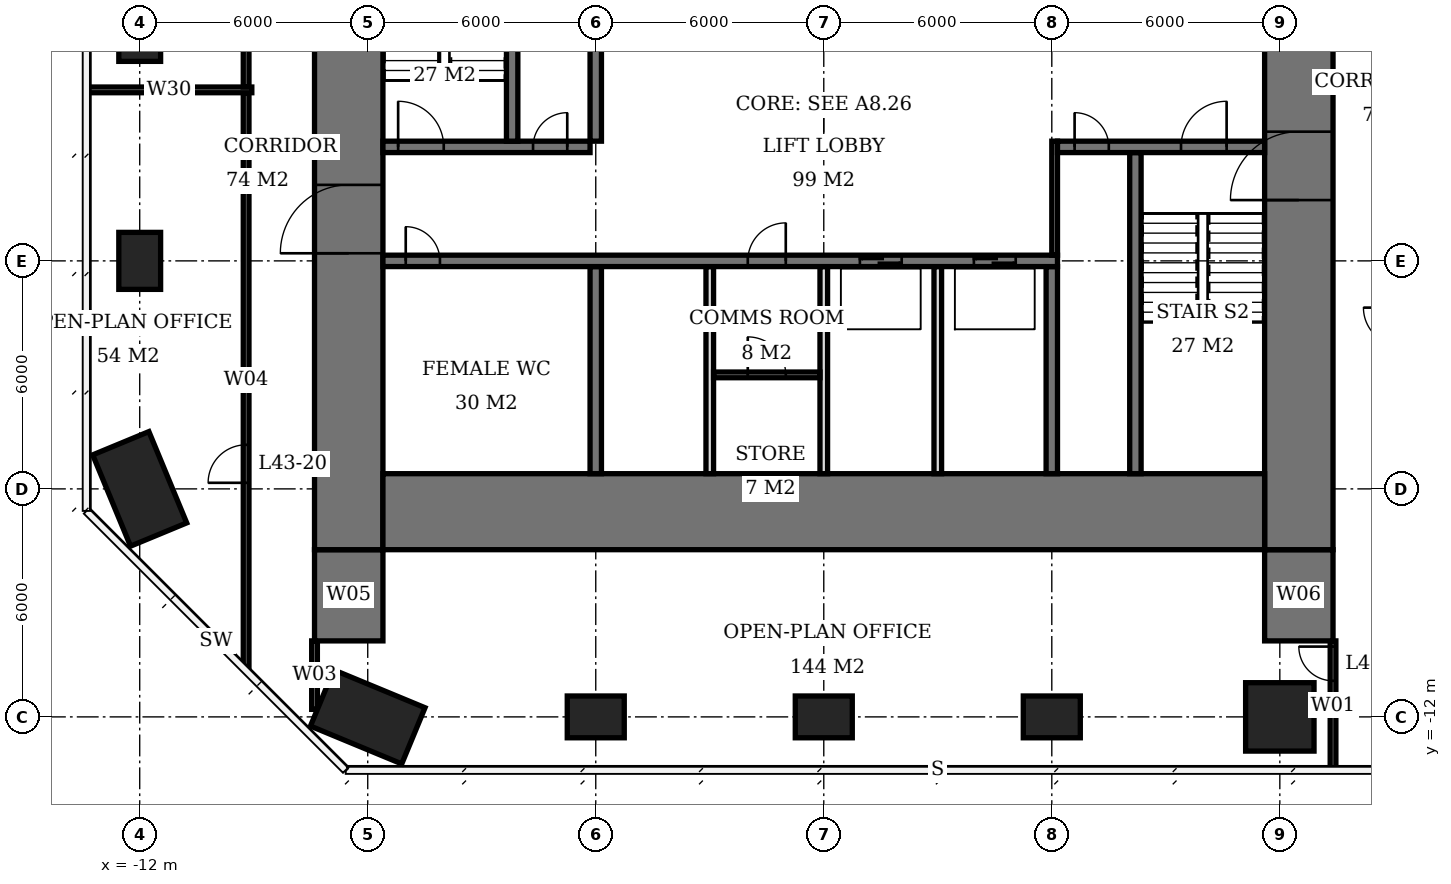
"""IFC4 building model, lengths in metres.
Left out: names, types, materials, properties, quantities, classifications, styles, units other than length and angle.
Written with IfcOpenShell. Run it as: python <this file> out.ifc"""

import sys

from ifc_helpers import new_model, si_unit, direction, frame, frame_2d, origin, origin_2d, place, context, subcontext, project, spatial, rectangle, extrude, element, fill, save


model = new_model("IFC4")
c1 = context("Model", 3, precision=1e-05, world=origin(), true_north=direction((0.0, 1.0)))
c2 = subcontext(c1, "Body", "Model", "MODEL_VIEW")
j1 = project(units=[si_unit("LENGTHUNIT", "METRE"), si_unit("PLANEANGLEUNIT", "RADIAN")], contexts=[c1])
p1 = place(None, origin())
s1 = spatial("IfcSite", under=j1, at=p1, CompositionType="ELEMENT")
p2 = place(p1, origin())
s2 = spatial("IfcBuilding", under=s1, at=p2, CompositionType="ELEMENT")
p3 = place(p2, frame((0.0, 0.0, 177.2)))
s3 = spatial("IfcBuildingStorey", under=s2, at=p3, CompositionType="ELEMENT", Elevation=177.2)
p4 = place(p3, frame((-12.0, -6.0, 0.0), z_axis=(0.0, 0.0, 1.0), x_axis=(-0.382683432365, 0.923879532511, 0.0)))
e1 = element("IfcColumn", 1, at=p4, inside=s3, PredefinedType="COLUMN", context=c2, shape_type="SweptSolid", body=[
    extrude(rectangle(XDim=2.6, YDim=1.6, at=origin_2d()), origin(), (0.0, 0.0, 1.0), 3.9),
])
for number, where, z_axis, x_axis in (
    (2, (-12.0, 0.0, 0.0), (0.0, 0.0, 1.0), (0.0, 1.0, 0.0)),
    (3, (-12.0, 6.0, 0.0), (0.0, 0.0, 1.0), (0.0, 1.0, 0.0)),
):
    element("IfcColumn", number, at=place(p3, frame(where, z_axis=z_axis, x_axis=x_axis)), inside=s3, PredefinedType="COLUMN", context=c2, shape_type="SweptSolid", body=[
        extrude(rectangle(XDim=1.5, YDim=1.1, at=origin_2d()), origin(), (0.0, 0.0, 1.0), 3.9),
    ])
p5 = place(p3, frame((-6.0, -12.0, 0.0), z_axis=(0.0, 0.0, 1.0), x_axis=(-0.923879532511, 0.382683432365, 0.0)))
e4 = element("IfcColumn", 4, at=p5, inside=s3, PredefinedType="COLUMN", context=c2, shape_type="SweptSolid", body=[
    extrude(rectangle(XDim=2.6, YDim=1.6, at=origin_2d()), origin(), (0.0, 0.0, 1.0), 3.9),
])
for number, where, z_axis, x_axis in (
    (5, (0.0, -12.0, 0.0), (0.0, 0.0, 1.0), (1.0, 0.0, 0.0)),
    (6, (6.0, -12.0, 0.0), (0.0, 0.0, 1.0), (1.0, 0.0, 0.0)),
    (7, (12.0, -12.0, 0.0), (0.0, 0.0, 1.0), (1.0, 0.0, 0.0)),
):
    element("IfcColumn", number, at=place(p3, frame(where, z_axis=z_axis, x_axis=x_axis)), inside=s3, PredefinedType="COLUMN", context=c2, shape_type="SweptSolid", body=[
        extrude(rectangle(XDim=1.5, YDim=1.1, at=origin_2d()), origin(), (0.0, 0.0, 1.0), 3.9),
    ])
p6 = place(p3, frame((18.0, -12.0, 0.0), z_axis=(0.0, 0.0, 1.0), x_axis=(1.0, 0.0, 0.0)))
e8 = element("IfcColumn", 8, at=p6, inside=s3, PredefinedType="COLUMN", context=c2, shape_type="SweptSolid", body=[
    extrude(rectangle(XDim=1.8, YDim=1.8, at=origin_2d()), origin(), (0.0, 0.0, 1.0), 3.9),
])
p7 = place(p3, frame((-5.6, -6.6, 0.0), z_axis=(0.0, 0.0, 1.0), x_axis=(1.0, 0.0, 0.0)))
e9 = element("IfcWall", 9, at=p7, inside=s3, PredefinedType="SHEAR", context=c2, shape_type="SweptSolid", body=[
    extrude(rectangle(XDim=23.2, YDim=2.0, at=frame_2d((11.6, 0.0))), origin(), (0.0, 0.0, 1.0), 3.9),
])
p8 = place(p3, frame((-6.5, -7.6, 0.0), z_axis=(0.0, 0.0, 1.0), x_axis=(0.0, 1.0, 0.0)))
e10 = element("IfcWall", 10, at=p8, inside=s3, PredefinedType="SHEAR", context=c2, shape_type="SweptSolid", body=[
    extrude(rectangle(XDim=21.2, YDim=1.8, at=frame_2d((10.6, 0.0))), origin(), (0.0, 0.0, 1.0), 3.9),
])
p9 = place(p8, frame((7.8, 0.0, 0.0)))
e11 = element("IfcOpeningElement", 11, at=p9, cuts=e10, PredefinedType="OPENING", context=c2, shape_type="SweptSolid", body=[
    extrude(rectangle(XDim=1.8, YDim=2.4, at=frame_2d((0.9, 1.2))), frame((0.0, 0.91, 0.0), z_axis=(0.0, -1.0, 0.0), x_axis=(1.0, 0.0, 0.0)), (0.0, 0.0, 1.0), 1.82),
])
p10 = place(p3, frame((18.5, -7.6, 0.0), z_axis=(0.0, 0.0, 1.0), x_axis=(0.0, 1.0, 0.0)))
e12 = element("IfcWall", 12, at=p10, inside=s3, PredefinedType="SHEAR", context=c2, shape_type="SweptSolid", body=[
    extrude(rectangle(XDim=21.2, YDim=1.8, at=frame_2d((10.6, 0.0))), origin(), (0.0, 0.0, 1.0), 3.9),
])
p11 = place(p10, frame((9.2, 0.0, 0.0)))
e13 = element("IfcOpeningElement", 13, at=p11, cuts=e12, PredefinedType="OPENING", context=c2, shape_type="SweptSolid", body=[
    extrude(rectangle(XDim=1.8, YDim=2.4, at=frame_2d((0.9, 1.2))), frame((0.0, 0.91, 0.0), z_axis=(0.0, -1.0, 0.0), x_axis=(1.0, 0.0, 0.0)), (0.0, 0.0, 1.0), 1.82),
])
for number, where, z_axis, x_axis in (
    (14, (-6.5, -10.0, 0.0), (0.0, 0.0, 1.0), (0.0, 1.0, 0.0)),
    (15, (18.5, -10.0, 0.0), (0.0, 0.0, 1.0), (0.0, 1.0, 0.0)),
):
    element("IfcWall", number, at=place(p3, frame(where, z_axis=z_axis, x_axis=x_axis)), inside=s3, PredefinedType="SHEAR", context=c2, shape_type="SweptSolid", body=[
        extrude(rectangle(XDim=2.4, YDim=1.8, at=frame_2d((1.2, 0.0))), origin(), (0.0, 0.0, 1.0), 3.9),
    ])
p12 = place(p3, frame((-5.6, 0.0, 0.0), z_axis=(0.0, 0.0, 1.0), x_axis=(1.0, 0.0, 0.0)))
e16 = element("IfcWall", 16, at=p12, inside=s3, PredefinedType="SHEAR", context=c2, shape_type="SweptSolid", body=[
    extrude(rectangle(XDim=17.75, YDim=0.3, at=frame_2d((8.875, 0.0))), origin(), (0.0, 0.0, 1.0), 3.9),
])
p13 = place(p12, frame((0.6, 0.0, 0.0)))
e17 = element("IfcOpeningElement", 17, at=p13, cuts=e16, PredefinedType="OPENING", context=c2, shape_type="SweptSolid", body=[
    extrude(rectangle(XDim=0.9, YDim=2.1, at=frame_2d((0.45, 1.05))), frame((0.0, 0.16, 0.0), z_axis=(0.0, -1.0, 0.0), x_axis=(1.0, 0.0, 0.0)), (0.0, 0.0, 1.0), 0.32),
])
p14 = place(p12, frame((9.6, 0.0, 0.0)))
e18 = element("IfcOpeningElement", 18, at=p14, cuts=e16, PredefinedType="OPENING", context=c2, shape_type="SweptSolid", body=[
    extrude(rectangle(XDim=1.0, YDim=2.1, at=frame_2d((0.5, 1.05))), frame((0.0, 0.16, 0.0), z_axis=(0.0, -1.0, 0.0), x_axis=(1.0, 0.0, 0.0)), (0.0, 0.0, 1.0), 0.32),
])
p15 = place(p12, frame((12.55, 0.0, 0.0)))
e19 = element("IfcOpeningElement", 19, at=p15, cuts=e16, PredefinedType="OPENING", context=c2, shape_type="SweptSolid", body=[
    extrude(rectangle(XDim=1.1, YDim=2.1, at=frame_2d((0.55, 1.05))), frame((0.0, 0.16, 0.0), z_axis=(0.0, -1.0, 0.0), x_axis=(1.0, 0.0, 0.0)), (0.0, 0.0, 1.0), 0.32),
])
p16 = place(p12, frame((15.55, 0.0, 0.0)))
e20 = element("IfcOpeningElement", 20, at=p16, cuts=e16, PredefinedType="OPENING", context=c2, shape_type="SweptSolid", body=[
    extrude(rectangle(XDim=1.1, YDim=2.1, at=frame_2d((0.55, 1.05))), frame((0.0, 0.16, 0.0), z_axis=(0.0, -1.0, 0.0), x_axis=(1.0, 0.0, 0.0)), (0.0, 0.0, 1.0), 0.32),
])
p17 = place(p3, frame((-5.6, 3.0, 0.0), z_axis=(0.0, 0.0, 1.0), x_axis=(1.0, 0.0, 0.0)))
e21 = element("IfcWall", 21, at=p17, inside=s3, PredefinedType="SHEAR", context=c2, shape_type="SweptSolid", body=[
    extrude(rectangle(XDim=5.45, YDim=0.3, at=frame_2d((2.725, 0.0))), origin(), (0.0, 0.0, 1.0), 3.9),
])
p18 = place(p17, frame((0.4, 0.0, 0.0)))
e22 = element("IfcOpeningElement", 22, at=p18, cuts=e21, PredefinedType="OPENING", context=c2, shape_type="SweptSolid", body=[
    extrude(rectangle(XDim=1.2, YDim=2.1, at=frame_2d((0.6, 1.05))), frame((0.0, 0.16, 0.0), z_axis=(0.0, -1.0, 0.0), x_axis=(1.0, 0.0, 0.0)), (0.0, 0.0, 1.0), 0.32),
])
p19 = place(p17, frame((3.95, 0.0, 0.0)))
e23 = element("IfcOpeningElement", 23, at=p19, cuts=e21, PredefinedType="OPENING", context=c2, shape_type="SweptSolid", body=[
    extrude(rectangle(XDim=0.9, YDim=2.1, at=frame_2d((0.45, 1.05))), frame((0.0, 0.16, 0.0), z_axis=(0.0, -1.0, 0.0), x_axis=(1.0, 0.0, 0.0)), (0.0, 0.0, 1.0), 0.32),
])
p20 = place(p3, frame((12.15, 3.0, 0.0), z_axis=(0.0, 0.0, 1.0), x_axis=(1.0, 0.0, 0.0)))
e24 = element("IfcWall", 24, at=p20, inside=s3, PredefinedType="SHEAR", context=c2, shape_type="SweptSolid", body=[
    extrude(rectangle(XDim=5.45, YDim=0.3, at=frame_2d((2.725, 0.0))), origin(), (0.0, 0.0, 1.0), 3.9),
])
p21 = place(p20, frame((3.25, 0.0, 0.0)))
e25 = element("IfcOpeningElement", 25, at=p21, cuts=e24, PredefinedType="OPENING", context=c2, shape_type="SweptSolid", body=[
    extrude(rectangle(XDim=1.2, YDim=2.1, at=frame_2d((0.6, 1.05))), frame((0.0, 0.16, 0.0), z_axis=(0.0, -1.0, 0.0), x_axis=(1.0, 0.0, 0.0)), (0.0, 0.0, 1.0), 0.32),
])
p22 = place(p20, frame((0.45, 0.0, 0.0)))
e26 = element("IfcOpeningElement", 26, at=p22, cuts=e24, PredefinedType="OPENING", context=c2, shape_type="SweptSolid", body=[
    extrude(rectangle(XDim=0.9, YDim=2.1, at=frame_2d((0.45, 1.05))), frame((0.0, 0.16, 0.0), z_axis=(0.0, -1.0, 0.0), x_axis=(1.0, 0.0, 0.0)), (0.0, 0.0, 1.0), 0.32),
])
p23 = place(p3, frame((0.0, -5.6, 0.0), z_axis=(0.0, 0.0, 1.0), x_axis=(0.0, 1.0, 0.0)))
e27 = element("IfcWall", 27, at=p23, inside=s3, PredefinedType="SHEAR", context=c2, shape_type="SweptSolid", body=[
    extrude(rectangle(XDim=5.45, YDim=0.3, at=frame_2d((2.725, 0.0))), origin(), (0.0, 0.0, 1.0), 3.9),
])
p24 = place(p3, frame((0.0, 3.15, 0.0), z_axis=(0.0, 0.0, 1.0), x_axis=(0.0, 1.0, 0.0)))
e28 = element("IfcWall", 28, at=p24, inside=s3, PredefinedType="SHEAR", context=c2, shape_type="SweptSolid", body=[
    extrude(rectangle(XDim=8.45, YDim=0.3, at=frame_2d((4.225, 0.0))), origin(), (0.0, 0.0, 1.0), 3.9),
])
p25 = place(p3, frame((12.0, -5.6, 0.0), z_axis=(0.0, 0.0, 1.0), x_axis=(0.0, 1.0, 0.0)))
e29 = element("IfcWall", 29, at=p25, inside=s3, PredefinedType="SHEAR", context=c2, shape_type="SweptSolid", body=[
    extrude(rectangle(XDim=5.45, YDim=0.3, at=frame_2d((2.725, 0.0))), origin(), (0.0, 0.0, 1.0), 3.9),
])
for number, where, z_axis, x_axis in (
    (30, (-2.2, 3.15, 0.0), (0.0, 0.0, 1.0), (0.0, 1.0, 0.0)),
    (31, (14.2, -5.6, 0.0), (0.0, 0.0, 1.0), (0.0, 1.0, 0.0)),
):
    element("IfcWall", number, at=place(p3, frame(where, z_axis=z_axis, x_axis=x_axis)), inside=s3, PredefinedType="SHEAR", context=c2, shape_type="SweptSolid", body=[
        extrude(rectangle(XDim=8.45, YDim=0.3, at=frame_2d((4.225, 0.0))), origin(), (0.0, 0.0, 1.0), 3.9),
    ])
for number, where, z_axis, x_axis in (
    (32, (3.0, -5.6, 0.0), (0.0, 0.0, 1.0), (0.0, 1.0, 0.0)),
    (33, (6.0, -5.6, 0.0), (0.0, 0.0, 1.0), (0.0, 1.0, 0.0)),
    (34, (9.0, -5.6, 0.0), (0.0, 0.0, 1.0), (0.0, 1.0, 0.0)),
):
    element("IfcWall", number, at=place(p3, frame(where, z_axis=z_axis, x_axis=x_axis)), inside=s3, PredefinedType="SOLIDWALL", context=c2, shape_type="SweptSolid", body=[
        extrude(rectangle(XDim=5.45, YDim=0.2, at=frame_2d((2.725, 0.0))), origin(), (0.0, 0.0, 1.0), 3.9),
    ])
p26 = place(p3, frame((3.1, -3.0, 0.0), z_axis=(0.0, 0.0, 1.0), x_axis=(1.0, 0.0, 0.0)))
e35 = element("IfcWall", 35, at=p26, inside=s3, PredefinedType="PARTITIONING", context=c2, shape_type="SweptSolid", body=[
    extrude(rectangle(XDim=2.8, YDim=0.15, at=frame_2d((1.4, 0.0))), origin(), (0.0, 0.0, 1.0), 3.65),
])
p27 = place(p26, frame((0.9, 0.0, 0.0)))
e36 = element("IfcOpeningElement", 36, at=p27, cuts=e35, PredefinedType="OPENING", context=c2, shape_type="SweptSolid", body=[
    extrude(rectangle(XDim=1.0, YDim=2.1, at=frame_2d((0.5, 1.05))), frame((0.0, 0.085, 0.0), z_axis=(0.0, -1.0, 0.0), x_axis=(1.0, 0.0, 0.0)), (0.0, 0.0, 1.0), 0.17),
])
p28 = place(p3, frame((-13.4, 4.5, 0.0), z_axis=(0.0, 0.0, 1.0), x_axis=(1.0, 0.0, 0.0)))
e37 = element("IfcWall", 37, at=p28, inside=s3, PredefinedType="PARTITIONING", context=c2, shape_type="SweptSolid", body=[
    extrude(rectangle(XDim=4.35, YDim=0.15, at=frame_2d((2.175, 0.0))), origin(), (0.0, 0.0, 1.0), 3.65),
])
p29 = place(p3, frame((-9.2, -10.689, 0.0), z_axis=(0.0, 0.0, 1.0), x_axis=(0.0, 1.0, 0.0)))
e38 = element("IfcWall", 38, at=p29, inside=s3, PredefinedType="PARTITIONING", context=c2, shape_type="SweptSolid", body=[
    extrude(rectangle(XDim=15.114, YDim=0.15, at=frame_2d((7.557, 0.0))), origin(), (0.0, 0.0, 1.0), 3.65),
])
p30 = place(p29, frame((4.849, 0.0, 0.0)))
e39 = element("IfcOpeningElement", 39, at=p30, cuts=e38, PredefinedType="OPENING", context=c2, shape_type="SweptSolid", body=[
    extrude(rectangle(XDim=1.0, YDim=2.1, at=frame_2d((0.5, 1.05))), frame((0.0, 0.085, 0.0), z_axis=(0.0, -1.0, 0.0), x_axis=(1.0, 0.0, 0.0)), (0.0, 0.0, 1.0), 0.17),
])
p31 = place(p3, frame((-9.2, 4.575, 0.0), z_axis=(0.0, 0.0, 1.0), x_axis=(0.0, 1.0, 0.0)))
e40 = element("IfcWall", 40, at=p31, inside=s3, PredefinedType="PARTITIONING", context=c2, shape_type="SweptSolid", body=[
    extrude(rectangle(XDim=24.114, YDim=0.15, at=frame_2d((12.057, 0.0))), origin(), (0.0, 0.0, 1.0), 3.65),
])
p32 = place(p31, frame((7.874, 0.0, 0.0)))
e41 = element("IfcOpeningElement", 41, at=p32, cuts=e40, PredefinedType="OPENING", context=c2, shape_type="SweptSolid", body=[
    extrude(rectangle(XDim=1.0, YDim=2.1, at=frame_2d((0.5, 1.05))), frame((0.0, 0.085, 0.0), z_axis=(0.0, -1.0, 0.0), x_axis=(1.0, 0.0, 0.0)), (0.0, 0.0, 1.0), 0.17),
])
p33 = place(p3, frame((-7.4, -11.802, 0.0), z_axis=(0.0, 0.0, 1.0), x_axis=(0.0, 1.0, 0.0)))
e42 = element("IfcWall", 42, at=p33, inside=s3, PredefinedType="PARTITIONING", context=c2, shape_type="SweptSolid", body=[
    extrude(rectangle(XDim=1.802, YDim=0.15, at=frame_2d((0.901, 0.0))), origin(), (0.0, 0.0, 1.0), 3.65),
])
p34 = place(p3, frame((19.4, -13.4, 0.0), z_axis=(0.0, 0.0, 1.0), x_axis=(0.0, 1.0, 0.0)))
e43 = element("IfcWall", 43, at=p34, inside=s3, PredefinedType="PARTITIONING", context=c2, shape_type="SweptSolid", body=[
    extrude(rectangle(XDim=3.4, YDim=0.15, at=frame_2d((1.7, 0.0))), origin(), (0.0, 0.0, 1.0), 3.65),
])
p35 = place(p34, frame((2.35, 0.0, 0.0)))
e44 = element("IfcOpeningElement", 44, at=p35, cuts=e43, PredefinedType="OPENING", context=c2, shape_type="SweptSolid", body=[
    extrude(rectangle(XDim=0.9, YDim=2.1, at=frame_2d((0.45, 1.05))), frame((0.0, 0.085, 0.0), z_axis=(0.0, -1.0, 0.0), x_axis=(1.0, 0.0, 0.0)), (0.0, 0.0, 1.0), 0.17),
])
p36 = place(p3, frame((12.075, 0.15, 0.0), z_axis=(0.0, 0.0, 1.0), x_axis=(0.0, 1.0, 0.0)))
e45 = element("IfcWall", 45, at=p36, inside=s3, PredefinedType="PARTITIONING", context=c2, shape_type="SweptSolid", body=[
    extrude(rectangle(XDim=3.0, YDim=0.15, at=frame_2d((1.5, 0.0))), origin(), (0.0, 0.0, 1.0), 3.65),
])
p37 = place(p9, origin())
e46 = element("IfcDoor", 46, at=p37, inside=s3, OperationType="DOUBLE_DOOR_SINGLE_SWING", PredefinedType="DOOR", context=c2, shape_type="SweptSolid", body=[
    extrude(rectangle(XDim=1.8, YDim=2.4, at=frame_2d((0.9, 1.2))), frame((0.0, 0.025, 0.0), z_axis=(0.0, -1.0, 0.0), x_axis=(1.0, 0.0, 0.0)), (0.0, 0.0, 1.0), 0.05),
])
fill(e11, e46)
p38 = place(p11, origin())
e47 = element("IfcDoor", 47, at=p38, inside=s3, OperationType="DOUBLE_DOOR_SINGLE_SWING", PredefinedType="DOOR", context=c2, shape_type="SweptSolid", body=[
    extrude(rectangle(XDim=1.8, YDim=2.4, at=frame_2d((0.9, 1.2))), frame((0.0, 0.025, 0.0), z_axis=(0.0, -1.0, 0.0), x_axis=(1.0, 0.0, 0.0)), (0.0, 0.0, 1.0), 0.05),
])
fill(e13, e47)
p39 = place(p18, origin())
e48 = element("IfcDoor", 48, at=p39, inside=s3, OperationType="SINGLE_SWING_LEFT", PredefinedType="DOOR", context=c2, shape_type="SweptSolid", body=[
    extrude(rectangle(XDim=1.2, YDim=2.1, at=frame_2d((0.6, 1.05))), frame((0.0, 0.025, 0.0), z_axis=(0.0, -1.0, 0.0), x_axis=(1.0, 0.0, 0.0)), (0.0, 0.0, 1.0), 0.05),
])
fill(e22, e48)
p40 = place(p19, origin())
e49 = element("IfcDoor", 49, at=p40, inside=s3, OperationType="SINGLE_SWING_RIGHT", PredefinedType="DOOR", context=c2, shape_type="SweptSolid", body=[
    extrude(rectangle(XDim=0.9, YDim=2.1, at=frame_2d((0.45, 1.05))), frame((0.0, 0.025, 0.0), z_axis=(0.0, -1.0, 0.0), x_axis=(1.0, 0.0, 0.0)), (0.0, 0.0, 1.0), 0.05),
])
fill(e23, e49)
p41 = place(p21, origin())
e50 = element("IfcDoor", 50, at=p41, inside=s3, OperationType="SINGLE_SWING_RIGHT", PredefinedType="DOOR", context=c2, shape_type="SweptSolid", body=[
    extrude(rectangle(XDim=1.2, YDim=2.1, at=frame_2d((0.6, 1.05))), frame((0.0, 0.025, 0.0), z_axis=(0.0, -1.0, 0.0), x_axis=(1.0, 0.0, 0.0)), (0.0, 0.0, 1.0), 0.05),
])
fill(e25, e50)
p42 = place(p22, origin())
e51 = element("IfcDoor", 51, at=p42, inside=s3, OperationType="SINGLE_SWING_LEFT", PredefinedType="DOOR", context=c2, shape_type="SweptSolid", body=[
    extrude(rectangle(XDim=0.9, YDim=2.1, at=frame_2d((0.45, 1.05))), frame((0.0, 0.025, 0.0), z_axis=(0.0, -1.0, 0.0), x_axis=(1.0, 0.0, 0.0)), (0.0, 0.0, 1.0), 0.05),
])
fill(e26, e51)
p43 = place(p13, origin())
e52 = element("IfcDoor", 52, at=p43, inside=s3, OperationType="SINGLE_SWING_LEFT", PredefinedType="DOOR", context=c2, shape_type="SweptSolid", body=[
    extrude(rectangle(XDim=0.9, YDim=2.1, at=frame_2d((0.45, 1.05))), frame((0.0, 0.025, 0.0), z_axis=(0.0, -1.0, 0.0), x_axis=(1.0, 0.0, 0.0)), (0.0, 0.0, 1.0), 0.05),
])
fill(e17, e52)
p44 = place(p27, origin())
e53 = element("IfcDoor", 53, at=p44, inside=s3, OperationType="SINGLE_SWING_LEFT", PredefinedType="DOOR", context=c2, shape_type="SweptSolid", body=[
    extrude(rectangle(XDim=1.0, YDim=2.1, at=frame_2d((0.5, 1.05))), frame((0.0, 0.025, 0.0), z_axis=(0.0, -1.0, 0.0), x_axis=(1.0, 0.0, 0.0)), (0.0, 0.0, 1.0), 0.05),
])
fill(e36, e53)
p45 = place(p14, origin())
e54 = element("IfcDoor", 54, at=p45, inside=s3, OperationType="SINGLE_SWING_RIGHT", PredefinedType="DOOR", context=c2, shape_type="SweptSolid", body=[
    extrude(rectangle(XDim=1.0, YDim=2.1, at=frame_2d((0.5, 1.05))), frame((0.0, 0.025, 0.0), z_axis=(0.0, -1.0, 0.0), x_axis=(1.0, 0.0, 0.0)), (0.0, 0.0, 1.0), 0.05),
])
fill(e18, e54)
p46 = place(p15, origin())
e55 = element("IfcDoor", 55, at=p46, inside=s3, OperationType="DOUBLE_DOOR_SLIDING", PredefinedType="USERDEFINED", context=c2, shape_type="SweptSolid", body=[
    extrude(rectangle(XDim=1.1, YDim=2.1, at=frame_2d((0.55, 1.05))), frame((0.0, 0.025, 0.0), z_axis=(0.0, -1.0, 0.0), x_axis=(1.0, 0.0, 0.0)), (0.0, 0.0, 1.0), 0.05),
])
fill(e19, e55)
p47 = place(p16, origin())
e56 = element("IfcDoor", 56, at=p47, inside=s3, OperationType="DOUBLE_DOOR_SLIDING", PredefinedType="USERDEFINED", context=c2, shape_type="SweptSolid", body=[
    extrude(rectangle(XDim=1.1, YDim=2.1, at=frame_2d((0.55, 1.05))), frame((0.0, 0.025, 0.0), z_axis=(0.0, -1.0, 0.0), x_axis=(1.0, 0.0, 0.0)), (0.0, 0.0, 1.0), 0.05),
])
fill(e20, e56)
p48 = place(p30, origin())
e57 = element("IfcDoor", 57, at=p48, inside=s3, OperationType="SINGLE_SWING_LEFT", PredefinedType="DOOR", context=c2, shape_type="SweptSolid", body=[
    extrude(rectangle(XDim=1.0, YDim=2.1, at=frame_2d((0.5, 1.05))), frame((0.0, 0.025, 0.0), z_axis=(0.0, -1.0, 0.0), x_axis=(1.0, 0.0, 0.0)), (0.0, 0.0, 1.0), 0.05),
])
fill(e39, e57)
p49 = place(p35, origin())
e58 = element("IfcDoor", 58, at=p49, inside=s3, OperationType="SINGLE_SWING_RIGHT", PredefinedType="DOOR", context=c2, shape_type="SweptSolid", body=[
    extrude(rectangle(XDim=0.9, YDim=2.1, at=frame_2d((0.45, 1.05))), frame((0.0, 0.025, 0.0), z_axis=(0.0, -1.0, 0.0), x_axis=(1.0, 0.0, 0.0)), (0.0, 0.0, 1.0), 0.05),
])
fill(e44, e58)
save(model, sys.argv[1])
